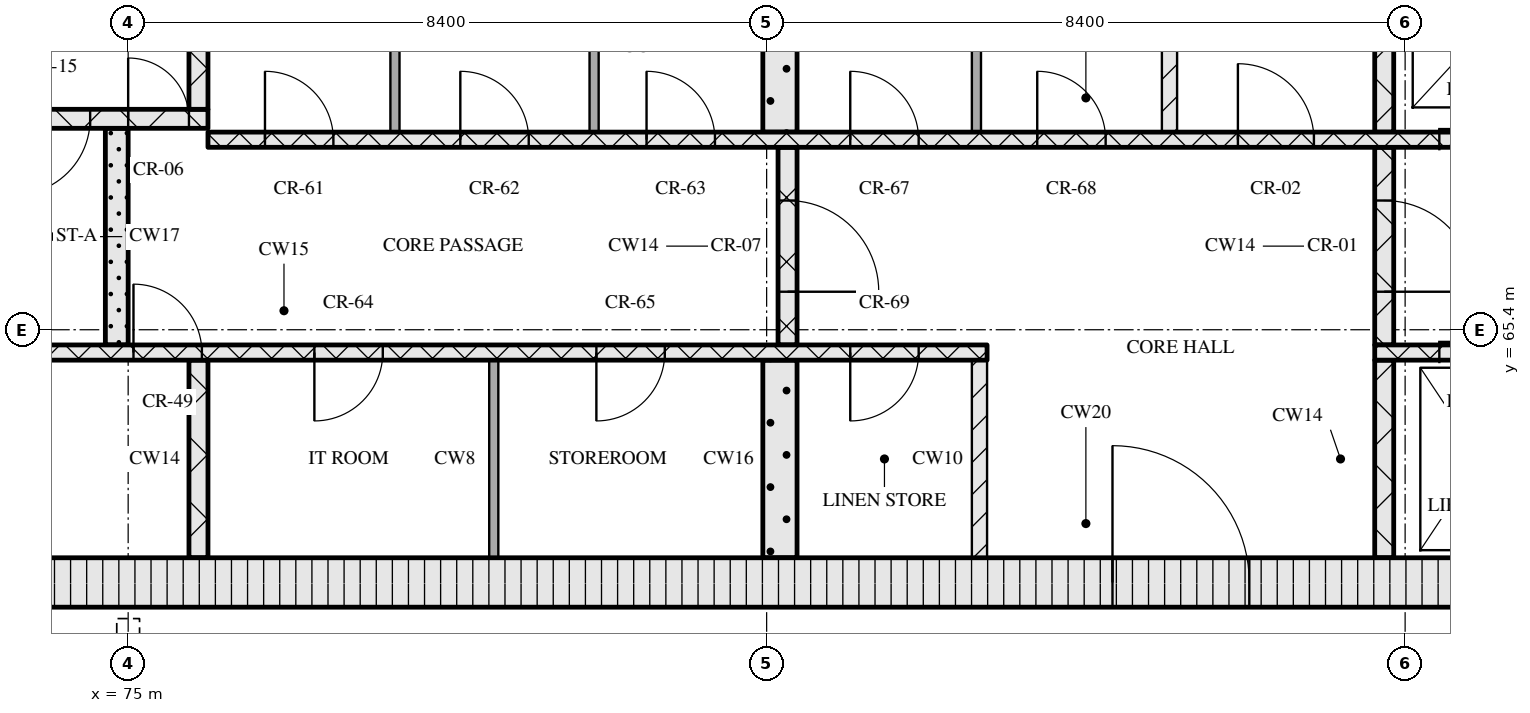
"""IFC4 building model, lengths in metres.
Left out: names, types, materials, properties, quantities, classifications, styles, units other than length and angle.
Written with IfcOpenShell. Run it as: python <this file> out.ifc"""

import sys

from ifc_helpers import new_model, si_unit, direction, frame, frame_2d, origin, place, context, subcontext, project, spatial, rectangle, extrude, element, fill, save


model = new_model("IFC4")
c1 = context("Model", 3, precision=1e-05, world=origin(), true_north=direction((0.0, 1.0)))
c2 = subcontext(c1, "Body", "Model", "MODEL_VIEW")
j1 = project(units=[si_unit("LENGTHUNIT", "METRE"), si_unit("PLANEANGLEUNIT", "RADIAN")], contexts=[c1])
p1 = place(None, origin())
s1 = spatial("IfcSite", under=j1, at=p1, CompositionType="ELEMENT")
p2 = place(p1, origin())
s2 = spatial("IfcBuilding", under=s1, at=p2, CompositionType="ELEMENT")
p3 = place(p2, frame((0.0, 0.0, 194.25)))
s3 = spatial("IfcBuildingStorey", under=s2, at=p3, CompositionType="ELEMENT", Elevation=194.25)
p4 = place(p3, frame((67.15, 62.075, 0.0), z_axis=(0.0, 0.0, 1.0), x_axis=(1.0, 0.0, 0.0)))
e1 = element("IfcWall", 1, at=p4, inside=s3, PredefinedType="SOLIDWALL", context=c2, shape_type="SweptSolid", body=[
    extrude(rectangle(XDim=40.9, YDim=0.65, at=frame_2d((20.45, 0.0))), origin(), (0.0, 0.0, 1.0), 10.97),
])
p5 = place(p4, frame((20.8, 0.0, 0.0)))
e2 = element("IfcOpeningElement", 2, at=p5, cuts=e1, PredefinedType="OPENING", context=c2, shape_type="SweptSolid", body=[
    extrude(rectangle(XDim=1.8, YDim=2.1, at=frame_2d((0.9, 1.05))), frame((0.0, 0.335, 0.0), z_axis=(0.0, -1.0, 0.0), x_axis=(1.0, 0.0, 0.0)), (0.0, 0.0, 1.0), 0.67),
])
p6 = place(p3, frame((75.925, 62.4, 0.0), z_axis=(0.0, 0.0, 1.0), x_axis=(0.0, 1.0, 0.0)))
e3 = element("IfcWall", 3, at=p6, inside=s3, PredefinedType="SOLIDWALL", context=c2, shape_type="SweptSolid", body=[
    extrude(rectangle(XDim=2.6, YDim=0.25, at=frame_2d((1.3, 0.0))), origin(), (0.0, 0.0, 1.0), 10.97),
])
p7 = place(p3, frame((79.81, 62.4, 0.0), z_axis=(0.0, 0.0, 1.0), x_axis=(0.0, 1.0, 0.0)))
e4 = element("IfcWall", 4, at=p7, inside=s3, PredefinedType="PARTITIONING", context=c2, shape_type="SweptSolid", body=[
    extrude(rectangle(XDim=2.6, YDim=0.12, at=frame_2d((1.3, 0.0))), origin(), (0.0, 0.0, 1.0), 10.97),
])
p8 = place(p3, frame((83.575, 62.4, 0.0), z_axis=(0.0, 0.0, 1.0), x_axis=(0.0, 1.0, 0.0)))
e5 = element("IfcWall", 5, at=p8, inside=s3, PredefinedType="SOLIDWALL", context=c2, shape_type="SweptSolid", body=[
    extrude(rectangle(XDim=2.6, YDim=0.45, at=frame_2d((1.3, 0.0))), origin(), (0.0, 0.0, 1.0), 10.97),
])
p9 = place(p3, frame((86.2, 62.4, 0.0), z_axis=(0.0, 0.0, 1.0), x_axis=(0.0, 1.0, 0.0)))
e6 = element("IfcWall", 6, at=p9, inside=s3, PredefinedType="PARTITIONING", context=c2, shape_type="SweptSolid", body=[
    extrude(rectangle(XDim=2.6, YDim=0.2, at=frame_2d((1.3, 0.0))), origin(), (0.0, 0.0, 1.0), 10.97),
])
p10 = place(p3, frame((91.525, 62.4, 0.0), z_axis=(0.0, 0.0, 1.0), x_axis=(0.0, 1.0, 0.0)))
e7 = element("IfcWall", 7, at=p10, inside=s3, PredefinedType="SOLIDWALL", context=c2, shape_type="SweptSolid", body=[
    extrude(rectangle(XDim=2.6, YDim=0.25, at=frame_2d((1.3, 0.0))), origin(), (0.0, 0.0, 1.0), 10.97),
])
p11 = place(p3, frame((67.8, 65.1, 0.0), z_axis=(0.0, 0.0, 1.0), x_axis=(1.0, 0.0, 0.0)))
e8 = element("IfcWall", 8, at=p11, inside=s3, PredefinedType="SOLIDWALL", context=c2, shape_type="SweptSolid", body=[
    extrude(rectangle(XDim=18.5, YDim=0.2, at=frame_2d((9.25, 0.0))), origin(), (0.0, 0.0, 1.0), 10.97),
])
p12 = place(p11, frame((7.27, 0.0, 0.0)))
e9 = element("IfcOpeningElement", 9, at=p12, cuts=e8, PredefinedType="OPENING", context=c2, shape_type="SweptSolid", body=[
    extrude(rectangle(XDim=0.9, YDim=2.1, at=frame_2d((0.45, 1.05))), frame((0.0, 0.11, 0.0), z_axis=(0.0, -1.0, 0.0), x_axis=(1.0, 0.0, 0.0)), (0.0, 0.0, 1.0), 0.22),
])
p13 = place(p11, frame((9.65, 0.0, 0.0)))
e10 = element("IfcOpeningElement", 10, at=p13, cuts=e8, PredefinedType="OPENING", context=c2, shape_type="SweptSolid", body=[
    extrude(rectangle(XDim=0.9, YDim=2.1, at=frame_2d((0.45, 1.05))), frame((0.0, 0.11, 0.0), z_axis=(0.0, -1.0, 0.0), x_axis=(1.0, 0.0, 0.0)), (0.0, 0.0, 1.0), 0.22),
])
p14 = place(p11, frame((13.36, 0.0, 0.0)))
e11 = element("IfcOpeningElement", 11, at=p14, cuts=e8, PredefinedType="OPENING", context=c2, shape_type="SweptSolid", body=[
    extrude(rectangle(XDim=0.9, YDim=2.1, at=frame_2d((0.45, 1.05))), frame((0.0, 0.11, 0.0), z_axis=(0.0, -1.0, 0.0), x_axis=(1.0, 0.0, 0.0)), (0.0, 0.0, 1.0), 0.22),
])
p15 = place(p11, frame((16.7, 0.0, 0.0)))
e12 = element("IfcOpeningElement", 12, at=p15, cuts=e8, PredefinedType="OPENING", context=c2, shape_type="SweptSolid", body=[
    extrude(rectangle(XDim=0.9, YDim=2.1, at=frame_2d((0.45, 1.05))), frame((0.0, 0.11, 0.0), z_axis=(0.0, -1.0, 0.0), x_axis=(1.0, 0.0, 0.0)), (0.0, 0.0, 1.0), 0.22),
])
p16 = place(p3, frame((91.4, 65.1, 0.0), z_axis=(0.0, 0.0, 1.0), x_axis=(1.0, 0.0, 0.0)))
e13 = element("IfcWall", 13, at=p16, inside=s3, PredefinedType="SOLIDWALL", context=c2, shape_type="SweptSolid", body=[
    extrude(rectangle(XDim=16.0, YDim=0.2, at=frame_2d((8.0, 0.0))), origin(), (0.0, 0.0, 1.0), 10.97),
])
p17 = place(p16, frame((0.85, 0.0, 0.0)))
e14 = element("IfcOpeningElement", 14, at=p17, cuts=e13, PredefinedType="OPENING", context=c2, shape_type="SweptSolid", body=[
    extrude(rectangle(XDim=1.1, YDim=2.1, at=frame_2d((0.55, 1.05))), frame((0.0, 0.11, 0.0), z_axis=(0.0, -1.0, 0.0), x_axis=(1.0, 0.0, 0.0)), (0.0, 0.0, 1.0), 0.22),
])
p18 = place(p16, frame((3.35, 0.0, 0.0)))
e15 = element("IfcOpeningElement", 15, at=p18, cuts=e13, PredefinedType="OPENING", context=c2, shape_type="SweptSolid", body=[
    extrude(rectangle(XDim=1.1, YDim=2.1, at=frame_2d((0.55, 1.05))), frame((0.0, 0.11, 0.0), z_axis=(0.0, -1.0, 0.0), x_axis=(1.0, 0.0, 0.0)), (0.0, 0.0, 1.0), 0.22),
])
p19 = place(p16, frame((5.85, 0.0, 0.0)))
e16 = element("IfcOpeningElement", 16, at=p19, cuts=e13, PredefinedType="OPENING", context=c2, shape_type="SweptSolid", body=[
    extrude(rectangle(XDim=1.1, YDim=2.1, at=frame_2d((0.55, 1.05))), frame((0.0, 0.11, 0.0), z_axis=(0.0, -1.0, 0.0), x_axis=(1.0, 0.0, 0.0)), (0.0, 0.0, 1.0), 0.22),
])
p20 = place(p16, frame((7.83, 0.0, 0.0)))
e17 = element("IfcOpeningElement", 17, at=p20, cuts=e13, PredefinedType="OPENING", context=c2, shape_type="SweptSolid", body=[
    extrude(rectangle(XDim=0.9, YDim=2.1, at=frame_2d((0.45, 1.05))), frame((0.0, 0.11, 0.0), z_axis=(0.0, -1.0, 0.0), x_axis=(1.0, 0.0, 0.0)), (0.0, 0.0, 1.0), 0.22),
])
p21 = place(p3, frame((74.85, 65.2, 0.0), z_axis=(0.0, 0.0, 1.0), x_axis=(0.0, 1.0, 0.0)))
e18 = element("IfcWall", 18, at=p21, inside=s3, PredefinedType="SOLIDWALL", context=c2, shape_type="SweptSolid", body=[
    extrude(rectangle(XDim=2.85, YDim=0.3, at=frame_2d((1.425, 0.0))), origin(), (0.0, 0.0, 1.0), 10.97),
])
p22 = place(p3, frame((83.675, 65.2, 0.0), z_axis=(0.0, 0.0, 1.0), x_axis=(0.0, 1.0, 0.0)))
e19 = element("IfcWall", 19, at=p22, inside=s3, PredefinedType="SOLIDWALL", context=c2, shape_type="SweptSolid", body=[
    extrude(rectangle(XDim=2.6, YDim=0.25, at=frame_2d((1.3, 0.0))), origin(), (0.0, 0.0, 1.0), 10.97),
])
p23 = place(p22, frame((0.7, 0.0, 0.0)))
e20 = element("IfcOpeningElement", 20, at=p23, cuts=e19, PredefinedType="OPENING", context=c2, shape_type="SweptSolid", body=[
    extrude(rectangle(XDim=1.2, YDim=2.1, at=frame_2d((0.6, 1.05))), frame((0.0, 0.135, 0.0), z_axis=(0.0, -1.0, 0.0), x_axis=(1.0, 0.0, 0.0)), (0.0, 0.0, 1.0), 0.27),
])
p24 = place(p3, frame((91.525, 65.2, 0.0), z_axis=(0.0, 0.0, 1.0), x_axis=(0.0, 1.0, 0.0)))
e21 = element("IfcWall", 21, at=p24, inside=s3, PredefinedType="SOLIDWALL", context=c2, shape_type="SweptSolid", body=[
    extrude(rectangle(XDim=2.6, YDim=0.25, at=frame_2d((1.3, 0.0))), origin(), (0.0, 0.0, 1.0), 10.97),
])
p25 = place(p24, frame((0.7, 0.0, 0.0)))
e22 = element("IfcOpeningElement", 22, at=p25, cuts=e21, PredefinedType="OPENING", context=c2, shape_type="SweptSolid", body=[
    extrude(rectangle(XDim=1.2, YDim=2.1, at=frame_2d((0.6, 1.05))), frame((0.0, 0.135, 0.0), z_axis=(0.0, -1.0, 0.0), x_axis=(1.0, 0.0, 0.0)), (0.0, 0.0, 1.0), 0.27),
])
p26 = place(p3, frame((76.05, 67.9, 0.0), z_axis=(0.0, 0.0, 1.0), x_axis=(1.0, 0.0, 0.0)))
e23 = element("IfcWall", 23, at=p26, inside=s3, PredefinedType="SOLIDWALL", context=c2, shape_type="SweptSolid", body=[
    extrude(rectangle(XDim=23.1, YDim=0.2, at=frame_2d((11.55, 0.0))), origin(), (0.0, 0.0, 1.0), 10.97),
])
p27 = place(p26, frame((0.75, 0.0, 0.0)))
e24 = element("IfcOpeningElement", 24, at=p27, cuts=e23, PredefinedType="OPENING", context=c2, shape_type="SweptSolid", body=[
    extrude(rectangle(XDim=0.9, YDim=2.1, at=frame_2d((0.45, 1.05))), frame((0.0, 0.11, 0.0), z_axis=(0.0, -1.0, 0.0), x_axis=(1.0, 0.0, 0.0)), (0.0, 0.0, 1.0), 0.22),
])
p28 = place(p26, frame((3.32, 0.0, 0.0)))
e25 = element("IfcOpeningElement", 25, at=p28, cuts=e23, PredefinedType="OPENING", context=c2, shape_type="SweptSolid", body=[
    extrude(rectangle(XDim=0.9, YDim=2.1, at=frame_2d((0.45, 1.05))), frame((0.0, 0.11, 0.0), z_axis=(0.0, -1.0, 0.0), x_axis=(1.0, 0.0, 0.0)), (0.0, 0.0, 1.0), 0.22),
])
p29 = place(p26, frame((5.77, 0.0, 0.0)))
e26 = element("IfcOpeningElement", 26, at=p29, cuts=e23, PredefinedType="OPENING", context=c2, shape_type="SweptSolid", body=[
    extrude(rectangle(XDim=0.9, YDim=2.1, at=frame_2d((0.45, 1.05))), frame((0.0, 0.11, 0.0), z_axis=(0.0, -1.0, 0.0), x_axis=(1.0, 0.0, 0.0)), (0.0, 0.0, 1.0), 0.22),
])
p30 = place(p26, frame((8.45, 0.0, 0.0)))
e27 = element("IfcOpeningElement", 27, at=p30, cuts=e23, PredefinedType="OPENING", context=c2, shape_type="SweptSolid", body=[
    extrude(rectangle(XDim=0.9, YDim=2.1, at=frame_2d((0.45, 1.05))), frame((0.0, 0.11, 0.0), z_axis=(0.0, -1.0, 0.0), x_axis=(1.0, 0.0, 0.0)), (0.0, 0.0, 1.0), 0.22),
])
p31 = place(p26, frame((10.91, 0.0, 0.0)))
e28 = element("IfcOpeningElement", 28, at=p31, cuts=e23, PredefinedType="OPENING", context=c2, shape_type="SweptSolid", body=[
    extrude(rectangle(XDim=0.9, YDim=2.1, at=frame_2d((0.45, 1.05))), frame((0.0, 0.11, 0.0), z_axis=(0.0, -1.0, 0.0), x_axis=(1.0, 0.0, 0.0)), (0.0, 0.0, 1.0), 0.22),
])
p32 = place(p26, frame((13.55, 0.0, 0.0)))
e29 = element("IfcOpeningElement", 29, at=p32, cuts=e23, PredefinedType="OPENING", context=c2, shape_type="SweptSolid", body=[
    extrude(rectangle(XDim=1.0, YDim=2.1, at=frame_2d((0.5, 1.05))), frame((0.0, 0.11, 0.0), z_axis=(0.0, -1.0, 0.0), x_axis=(1.0, 0.0, 0.0)), (0.0, 0.0, 1.0), 0.22),
])
p33 = place(p26, frame((16.2, 0.0, 0.0)))
e30 = element("IfcOpeningElement", 30, at=p33, cuts=e23, PredefinedType="OPENING", context=c2, shape_type="SweptSolid", body=[
    extrude(rectangle(XDim=1.1, YDim=2.1, at=frame_2d((0.55, 1.05))), frame((0.0, 0.11, 0.0), z_axis=(0.0, -1.0, 0.0), x_axis=(1.0, 0.0, 0.0)), (0.0, 0.0, 1.0), 0.22),
])
p34 = place(p26, frame((18.7, 0.0, 0.0)))
e31 = element("IfcOpeningElement", 31, at=p34, cuts=e23, PredefinedType="OPENING", context=c2, shape_type="SweptSolid", body=[
    extrude(rectangle(XDim=1.1, YDim=2.1, at=frame_2d((0.55, 1.05))), frame((0.0, 0.11, 0.0), z_axis=(0.0, -1.0, 0.0), x_axis=(1.0, 0.0, 0.0)), (0.0, 0.0, 1.0), 0.22),
])
p35 = place(p26, frame((21.2, 0.0, 0.0)))
e32 = element("IfcOpeningElement", 32, at=p35, cuts=e23, PredefinedType="OPENING", context=c2, shape_type="SweptSolid", body=[
    extrude(rectangle(XDim=1.1, YDim=2.1, at=frame_2d((0.55, 1.05))), frame((0.0, 0.11, 0.0), z_axis=(0.0, -1.0, 0.0), x_axis=(1.0, 0.0, 0.0)), (0.0, 0.0, 1.0), 0.22),
])
for number, where, z_axis, x_axis in (
    (33, (78.51, 68.0, 0.0), (0.0, 0.0, 1.0), (0.0, 1.0, 0.0)),
    (34, (81.13, 68.0, 0.0), (0.0, 0.0, 1.0), (0.0, 1.0, 0.0)),
):
    element("IfcWall", number, at=place(p3, frame(where, z_axis=z_axis, x_axis=x_axis)), inside=s3, PredefinedType="PARTITIONING", context=c2, shape_type="SweptSolid", body=[
        extrude(rectangle(XDim=2.6, YDim=0.12, at=frame_2d((1.3, 0.0))), origin(), (0.0, 0.0, 1.0), 10.97),
    ])
p36 = place(p3, frame((83.575, 68.0, 0.0), z_axis=(0.0, 0.0, 1.0), x_axis=(0.0, 1.0, 0.0)))
e35 = element("IfcWall", 35, at=p36, inside=s3, PredefinedType="SOLIDWALL", context=c2, shape_type="SweptSolid", body=[
    extrude(rectangle(XDim=2.6, YDim=0.45, at=frame_2d((1.3, 0.0))), origin(), (0.0, 0.0, 1.0), 10.97),
])
p37 = place(p3, frame((86.16, 68.0, 0.0), z_axis=(0.0, 0.0, 1.0), x_axis=(0.0, 1.0, 0.0)))
e36 = element("IfcWall", 36, at=p37, inside=s3, PredefinedType="PARTITIONING", context=c2, shape_type="SweptSolid", body=[
    extrude(rectangle(XDim=2.6, YDim=0.12, at=frame_2d((1.3, 0.0))), origin(), (0.0, 0.0, 1.0), 10.97),
])
p38 = place(p3, frame((88.7, 68.0, 0.0), z_axis=(0.0, 0.0, 1.0), x_axis=(0.0, 1.0, 0.0)))
e37 = element("IfcWall", 37, at=p38, inside=s3, PredefinedType="PARTITIONING", context=c2, shape_type="SweptSolid", body=[
    extrude(rectangle(XDim=2.6, YDim=0.2, at=frame_2d((1.3, 0.0))), origin(), (0.0, 0.0, 1.0), 10.97),
])
p39 = place(p3, frame((91.525, 68.0, 0.0), z_axis=(0.0, 0.0, 1.0), x_axis=(0.0, 1.0, 0.0)))
e38 = element("IfcWall", 38, at=p39, inside=s3, PredefinedType="SOLIDWALL", context=c2, shape_type="SweptSolid", body=[
    extrude(rectangle(XDim=2.6, YDim=0.25, at=frame_2d((1.3, 0.0))), origin(), (0.0, 0.0, 1.0), 10.97),
])
p40 = place(p3, frame((67.8, 68.175, 0.0), z_axis=(0.0, 0.0, 1.0), x_axis=(1.0, 0.0, 0.0)))
e39 = element("IfcWall", 39, at=p40, inside=s3, PredefinedType="SOLIDWALL", context=c2, shape_type="SweptSolid", body=[
    extrude(rectangle(XDim=8.25, YDim=0.25, at=frame_2d((4.125, 0.0))), origin(), (0.0, 0.0, 1.0), 10.97),
])
p41 = place(p40, frame((5.7, 0.0, 0.0)))
e40 = element("IfcOpeningElement", 40, at=p41, cuts=e39, PredefinedType="OPENING", context=c2, shape_type="SweptSolid", body=[
    extrude(rectangle(XDim=1.0, YDim=2.1, at=frame_2d((0.5, 1.05))), frame((0.0, 0.135, 0.0), z_axis=(0.0, -1.0, 0.0), x_axis=(1.0, 0.0, 0.0)), (0.0, 0.0, 1.0), 0.27),
])
p42 = place(p40, frame((7.2, 0.0, 0.0)))
e41 = element("IfcOpeningElement", 41, at=p42, cuts=e39, PredefinedType="OPENING", context=c2, shape_type="SweptSolid", body=[
    extrude(rectangle(XDim=0.8, YDim=2.1, at=frame_2d((0.4, 1.05))), frame((0.0, 0.135, 0.0), z_axis=(0.0, -1.0, 0.0), x_axis=(1.0, 0.0, 0.0)), (0.0, 0.0, 1.0), 0.27),
])
p43 = place(p3, frame((75.925, 68.3, 0.0), z_axis=(0.0, 0.0, 1.0), x_axis=(0.0, 1.0, 0.0)))
e42 = element("IfcWall", 42, at=p43, inside=s3, PredefinedType="SOLIDWALL", context=c2, shape_type="SweptSolid", body=[
    extrude(rectangle(XDim=2.3, YDim=0.25, at=frame_2d((1.15, 0.0))), origin(), (0.0, 0.0, 1.0), 10.97),
])
p44 = place(p5, origin())
e43 = element("IfcDoor", 43, at=p44, inside=s3, OperationType="DOUBLE_DOOR_SINGLE_SWING", PredefinedType="DOOR", context=c2, shape_type="SweptSolid", body=[
    extrude(rectangle(XDim=1.8, YDim=2.1, at=frame_2d((0.9, 1.05))), frame((0.0, 0.025, 0.0), z_axis=(0.0, -1.0, 0.0), x_axis=(1.0, 0.0, 0.0)), (0.0, 0.0, 1.0), 0.05),
])
fill(e2, e43)
p45 = place(p12, origin())
e44 = element("IfcDoor", 44, at=p45, inside=s3, OperationType="SINGLE_SWING_LEFT", PredefinedType="DOOR", context=c2, shape_type="SweptSolid", body=[
    extrude(rectangle(XDim=0.9, YDim=2.1, at=frame_2d((0.45, 1.05))), frame((0.0, 0.025, 0.0), z_axis=(0.0, -1.0, 0.0), x_axis=(1.0, 0.0, 0.0)), (0.0, 0.0, 1.0), 0.05),
])
fill(e9, e44)
p46 = place(p13, origin())
e45 = element("IfcDoor", 45, at=p46, inside=s3, OperationType="SINGLE_SWING_RIGHT", PredefinedType="DOOR", context=c2, shape_type="SweptSolid", body=[
    extrude(rectangle(XDim=0.9, YDim=2.1, at=frame_2d((0.45, 1.05))), frame((0.0, 0.025, 0.0), z_axis=(0.0, -1.0, 0.0), x_axis=(1.0, 0.0, 0.0)), (0.0, 0.0, 1.0), 0.05),
])
fill(e10, e45)
p47 = place(p14, origin())
e46 = element("IfcDoor", 46, at=p47, inside=s3, OperationType="SINGLE_SWING_RIGHT", PredefinedType="DOOR", context=c2, shape_type="SweptSolid", body=[
    extrude(rectangle(XDim=0.9, YDim=2.1, at=frame_2d((0.45, 1.05))), frame((0.0, 0.025, 0.0), z_axis=(0.0, -1.0, 0.0), x_axis=(1.0, 0.0, 0.0)), (0.0, 0.0, 1.0), 0.05),
])
fill(e11, e46)
p48 = place(p15, origin())
e47 = element("IfcDoor", 47, at=p48, inside=s3, OperationType="SINGLE_SWING_RIGHT", PredefinedType="DOOR", context=c2, shape_type="SweptSolid", body=[
    extrude(rectangle(XDim=0.9, YDim=2.1, at=frame_2d((0.45, 1.05))), frame((0.0, 0.025, 0.0), z_axis=(0.0, -1.0, 0.0), x_axis=(1.0, 0.0, 0.0)), (0.0, 0.0, 1.0), 0.05),
])
fill(e12, e47)
p49 = place(p17, origin())
e48 = element("IfcDoor", 48, at=p49, inside=s3, OperationType="SLIDING_TO_LEFT", PredefinedType="DOOR", context=c2, shape_type="SweptSolid", body=[
    extrude(rectangle(XDim=1.1, YDim=2.1, at=frame_2d((0.55, 1.05))), frame((0.0, 0.025, 0.0), z_axis=(0.0, -1.0, 0.0), x_axis=(1.0, 0.0, 0.0)), (0.0, 0.0, 1.0), 0.05),
])
fill(e14, e48)
p50 = place(p23, origin())
e49 = element("IfcDoor", 49, at=p50, inside=s3, OperationType="SINGLE_SWING_RIGHT", PredefinedType="DOOR", context=c2, shape_type="SweptSolid", body=[
    extrude(rectangle(XDim=1.2, YDim=2.1, at=frame_2d((0.6, 1.05))), frame((0.0, 0.025, 0.0), z_axis=(0.0, -1.0, 0.0), x_axis=(1.0, 0.0, 0.0)), (0.0, 0.0, 1.0), 0.05),
])
fill(e20, e49)
p51 = place(p25, origin())
e50 = element("IfcDoor", 50, at=p51, inside=s3, OperationType="SINGLE_SWING_RIGHT", PredefinedType="DOOR", context=c2, shape_type="SweptSolid", body=[
    extrude(rectangle(XDim=1.2, YDim=2.1, at=frame_2d((0.6, 1.05))), frame((0.0, 0.025, 0.0), z_axis=(0.0, -1.0, 0.0), x_axis=(1.0, 0.0, 0.0)), (0.0, 0.0, 1.0), 0.05),
])
fill(e22, e50)
p52 = place(p27, origin())
e51 = element("IfcDoor", 51, at=p52, inside=s3, OperationType="SINGLE_SWING_LEFT", PredefinedType="DOOR", context=c2, shape_type="SweptSolid", body=[
    extrude(rectangle(XDim=0.9, YDim=2.1, at=frame_2d((0.45, 1.05))), frame((0.0, 0.025, 0.0), z_axis=(0.0, -1.0, 0.0), x_axis=(1.0, 0.0, 0.0)), (0.0, 0.0, 1.0), 0.05),
])
fill(e24, e51)
p53 = place(p28, origin())
e52 = element("IfcDoor", 52, at=p53, inside=s3, OperationType="SINGLE_SWING_LEFT", PredefinedType="DOOR", context=c2, shape_type="SweptSolid", body=[
    extrude(rectangle(XDim=0.9, YDim=2.1, at=frame_2d((0.45, 1.05))), frame((0.0, 0.025, 0.0), z_axis=(0.0, -1.0, 0.0), x_axis=(1.0, 0.0, 0.0)), (0.0, 0.0, 1.0), 0.05),
])
fill(e25, e52)
p54 = place(p29, origin())
e53 = element("IfcDoor", 53, at=p54, inside=s3, OperationType="SINGLE_SWING_LEFT", PredefinedType="DOOR", context=c2, shape_type="SweptSolid", body=[
    extrude(rectangle(XDim=0.9, YDim=2.1, at=frame_2d((0.45, 1.05))), frame((0.0, 0.025, 0.0), z_axis=(0.0, -1.0, 0.0), x_axis=(1.0, 0.0, 0.0)), (0.0, 0.0, 1.0), 0.05),
])
fill(e26, e53)
p55 = place(p30, origin())
e54 = element("IfcDoor", 54, at=p55, inside=s3, OperationType="SINGLE_SWING_LEFT", PredefinedType="DOOR", context=c2, shape_type="SweptSolid", body=[
    extrude(rectangle(XDim=0.9, YDim=2.1, at=frame_2d((0.45, 1.05))), frame((0.0, 0.025, 0.0), z_axis=(0.0, -1.0, 0.0), x_axis=(1.0, 0.0, 0.0)), (0.0, 0.0, 1.0), 0.05),
])
fill(e27, e54)
p56 = place(p31, origin())
e55 = element("IfcDoor", 55, at=p56, inside=s3, OperationType="SINGLE_SWING_LEFT", PredefinedType="DOOR", context=c2, shape_type="SweptSolid", body=[
    extrude(rectangle(XDim=0.9, YDim=2.1, at=frame_2d((0.45, 1.05))), frame((0.0, 0.025, 0.0), z_axis=(0.0, -1.0, 0.0), x_axis=(1.0, 0.0, 0.0)), (0.0, 0.0, 1.0), 0.05),
])
fill(e28, e55)
p57 = place(p32, origin())
e56 = element("IfcDoor", 56, at=p57, inside=s3, OperationType="SINGLE_SWING_LEFT", PredefinedType="DOOR", context=c2, shape_type="SweptSolid", body=[
    extrude(rectangle(XDim=1.0, YDim=2.1, at=frame_2d((0.5, 1.05))), frame((0.0, 0.025, 0.0), z_axis=(0.0, -1.0, 0.0), x_axis=(1.0, 0.0, 0.0)), (0.0, 0.0, 1.0), 0.05),
])
fill(e29, e56)
p58 = place(p33, origin())
e57 = element("IfcDoor", 57, at=p58, inside=s3, OperationType="SLIDING_TO_RIGHT", PredefinedType="DOOR", context=c2, shape_type="SweptSolid", body=[
    extrude(rectangle(XDim=1.1, YDim=2.1, at=frame_2d((0.55, 1.05))), frame((0.0, 0.025, 0.0), z_axis=(0.0, -1.0, 0.0), x_axis=(1.0, 0.0, 0.0)), (0.0, 0.0, 1.0), 0.05),
])
fill(e30, e57)
p59 = place(p41, origin())
e58 = element("IfcDoor", 58, at=p59, inside=s3, OperationType="SINGLE_SWING_RIGHT", PredefinedType="DOOR", context=c2, shape_type="SweptSolid", body=[
    extrude(rectangle(XDim=1.0, YDim=2.1, at=frame_2d((0.5, 1.05))), frame((0.0, 0.025, 0.0), z_axis=(0.0, -1.0, 0.0), x_axis=(1.0, 0.0, 0.0)), (0.0, 0.0, 1.0), 0.05),
])
fill(e40, e58)
p60 = place(p42, origin())
e59 = element("IfcDoor", 59, at=p60, inside=s3, OperationType="SINGLE_SWING_LEFT", PredefinedType="DOOR", context=c2, shape_type="SweptSolid", body=[
    extrude(rectangle(XDim=0.8, YDim=2.1, at=frame_2d((0.4, 1.05))), frame((0.0, 0.025, 0.0), z_axis=(0.0, -1.0, 0.0), x_axis=(1.0, 0.0, 0.0)), (0.0, 0.0, 1.0), 0.05),
])
fill(e41, e59)
save(model, sys.argv[1])
